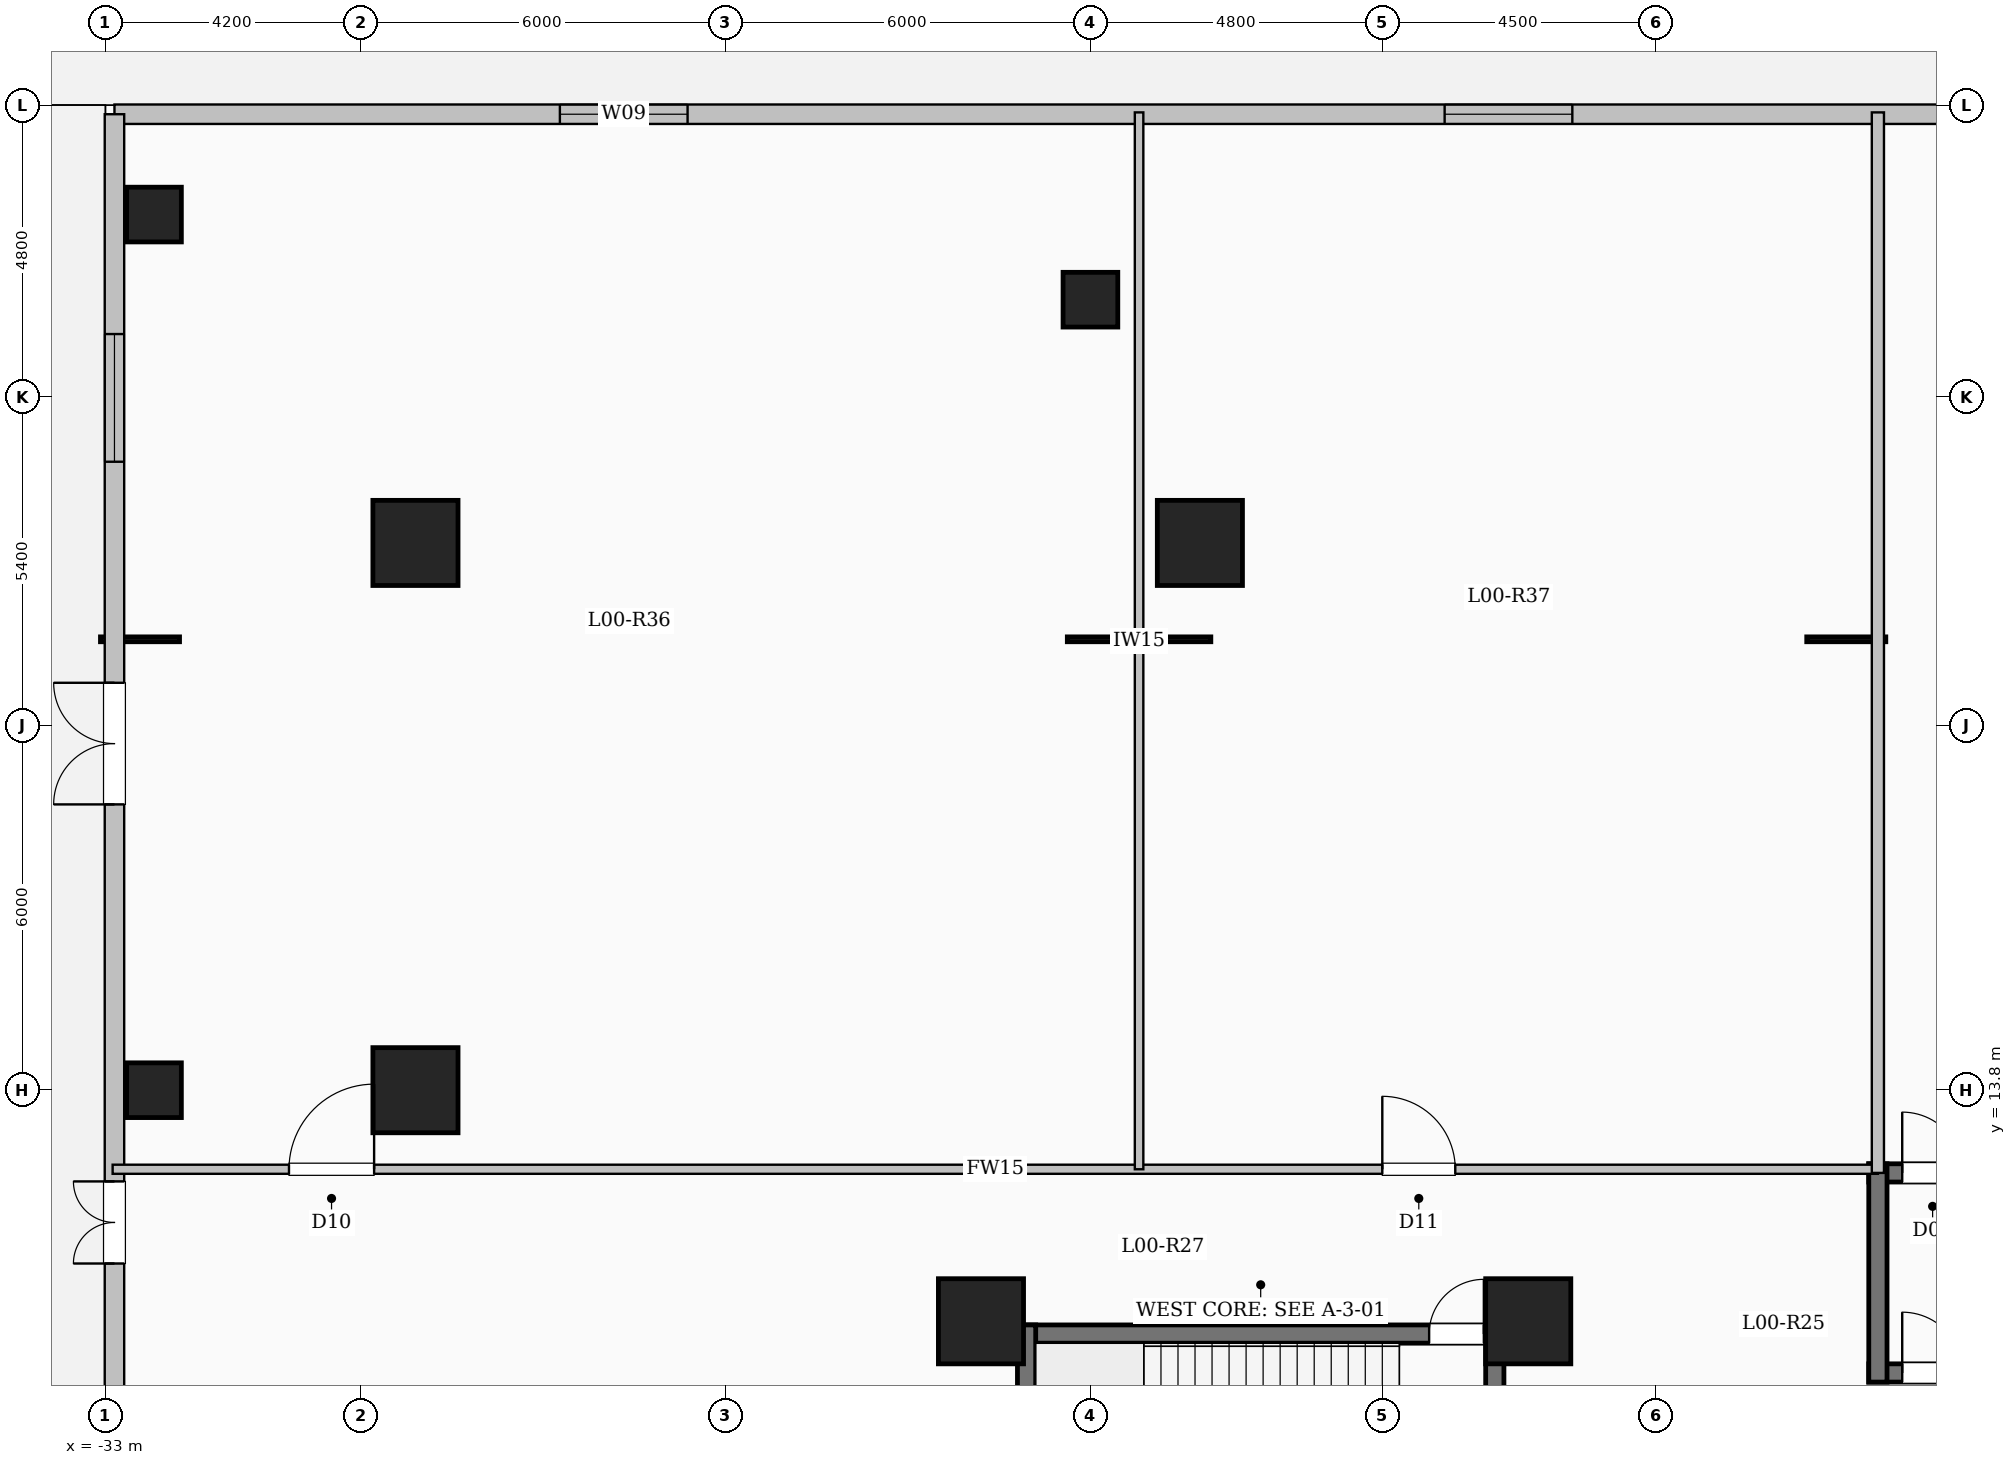
"""IFC4 building model, lengths in metres.
Left out: names, types, materials, properties, quantities, classifications, styles, units other than length and angle.
Written with IfcOpenShell. Run it as: python <this file> out.ifc"""

import sys

from ifc_helpers import new_model, si_unit, direction, frame, frame_2d, origin, origin_2d, place, context, subcontext, project, spatial, rectangle, extrude, element, fill, save


model = new_model("IFC4")
c1 = context("Model", 3, precision=1e-05, world=origin(), true_north=direction((0.0, 1.0)))
c2 = subcontext(c1, "Body", "Model", "MODEL_VIEW")
j1 = project(units=[si_unit("LENGTHUNIT", "METRE"), si_unit("PLANEANGLEUNIT", "RADIAN")], contexts=[c1])
p1 = place(None, origin())
s1 = spatial("IfcSite", under=j1, at=p1, CompositionType="ELEMENT")
p2 = place(p1, origin())
s2 = spatial("IfcBuilding", under=s1, at=p2, CompositionType="ELEMENT")
p3 = place(p2, origin())
s3 = spatial("IfcBuildingStorey", under=s2, at=p3, CompositionType="ELEMENT", Elevation=0.0)
for number, where, z_axis, x_axis in (
    (1, (-9.6, 10.0, 0.0), (0.0, 0.0, 1.0), (1.0, 0.0, 0.0)),
    (2, (-18.6, 10.0, 0.0), (0.0, 0.0, 1.0), (1.0, 0.0, 0.0)),
):
    element("IfcColumn", number, at=place(p3, frame(where, z_axis=z_axis, x_axis=x_axis)), inside=s3, PredefinedType="COLUMN", context=c2, shape_type="SweptSolid", body=[
        extrude(rectangle(XDim=1.4, YDim=1.4, at=origin_2d()), origin(), (0.0, 0.0, 1.0), 5.4),
    ])
for number, where, z_axis, x_axis in (
    (3, (-32.2, 13.8, 0.0), (0.0, 0.0, 1.0), (1.0, 0.0, 0.0)),
    (4, (-32.2, 28.2, 0.0), (0.0, 0.0, 1.0), (1.0, 0.0, 0.0)),
):
    element("IfcColumn", number, at=place(p3, frame(where, z_axis=z_axis, x_axis=x_axis)), inside=s3, PredefinedType="COLUMN", context=c2, shape_type="SweptSolid", body=[
        extrude(rectangle(XDim=0.9, YDim=0.9, at=origin_2d()), origin(), (0.0, 0.0, 1.0), 5.18),
    ])
p4 = place(p3, frame((-16.8, 26.8, 0.0), z_axis=(0.0, 0.0, 1.0), x_axis=(1.0, 0.0, 0.0)))
e5 = element("IfcColumn", 5, at=p4, inside=s3, PredefinedType="COLUMN", context=c2, shape_type="SweptSolid", body=[
    extrude(rectangle(XDim=0.9, YDim=0.9, at=origin_2d()), origin(), (0.0, 0.0, 1.0), 5.4),
])
for number, where, z_axis, x_axis in (
    (6, (-27.9, 22.8, 0.0), (0.0, 0.0, 1.0), (1.0, 0.0, 0.0)),
    (7, (-15.0, 22.8, 0.0), (0.0, 0.0, 1.0), (1.0, 0.0, 0.0)),
    (8, (-27.9, 13.8, 0.0), (0.0, 0.0, 1.0), (1.0, 0.0, 0.0)),
):
    element("IfcColumn", number, at=place(p3, frame(where, z_axis=z_axis, x_axis=x_axis)), inside=s3, PredefinedType="COLUMN", context=c2, shape_type="SweptSolid", body=[
        extrude(rectangle(XDim=1.4, YDim=1.4, at=origin_2d()), origin(), (0.0, 0.0, 1.0), 5.4),
    ])
p5 = place(p3, frame((-32.85, 29.85, 0.0), z_axis=(0.0, 0.0, 1.0), x_axis=(1.0, 0.0, 0.0)))
e9 = element("IfcWall", 9, at=p5, inside=s3, PredefinedType="SOLIDWALL", context=c2, shape_type="SweptSolid", body=[
    extrude(rectangle(XDim=65.7, YDim=0.32, at=frame_2d((32.85, 0.0))), origin(), (0.0, 0.0, 1.0), 5.1),
])
p6 = place(p5, frame((30.05, 0.0, 0.0)))
e10 = element("IfcOpeningElement", 10, at=p6, cuts=e9, PredefinedType="OPENING", context=c2, shape_type="SweptSolid", body=[
    extrude(rectangle(XDim=2.0, YDim=2.4, at=frame_2d((1.0, 1.2))), frame((0.0, 0.17, 0.0), z_axis=(0.0, -1.0, 0.0), x_axis=(1.0, 0.0, 0.0)), (0.0, 0.0, 1.0), 0.34),
])
p7 = place(p5, frame((33.65, 0.0, 0.0)))
e11 = element("IfcOpeningElement", 11, at=p7, cuts=e9, PredefinedType="OPENING", context=c2, shape_type="SweptSolid", body=[
    extrude(rectangle(XDim=2.0, YDim=2.4, at=frame_2d((1.0, 1.2))), frame((0.0, 0.17, 0.0), z_axis=(0.0, -1.0, 0.0), x_axis=(1.0, 0.0, 0.0)), (0.0, 0.0, 1.0), 0.34),
])
p8 = place(p5, frame((39.35, 0.0, 0.0)))
e12 = element("IfcOpeningElement", 12, at=p8, cuts=e9, PredefinedType="OPENING", context=c2, shape_type="SweptSolid", body=[
    extrude(rectangle(XDim=1.1, YDim=2.2, at=frame_2d((0.55, 1.1))), frame((0.0, 0.17, 0.0), z_axis=(0.0, -1.0, 0.0), x_axis=(1.0, 0.0, 0.0)), (0.0, 0.0, 1.0), 0.34),
])
p9 = place(p5, frame((58.05, 0.0, 0.0)))
e13 = element("IfcOpeningElement", 13, at=p9, cuts=e9, PredefinedType="OPENING", context=c2, shape_type="SweptSolid", body=[
    extrude(rectangle(XDim=2.4, YDim=2.6, at=frame_2d((1.2, 1.3))), frame((0.0, 0.17, 0.0), z_axis=(0.0, -1.0, 0.0), x_axis=(1.0, 0.0, 0.0)), (0.0, 0.0, 1.0), 0.34),
])
p10 = place(p5, frame((7.325, 0.0, 0.9)))
e14 = element("IfcOpeningElement", 14, at=p10, cuts=e9, PredefinedType="OPENING", context=c2, shape_type="SweptSolid", body=[
    extrude(rectangle(XDim=2.1, YDim=2.0, at=frame_2d((1.05, 1.0))), frame((0.0, 0.17, 0.0), z_axis=(0.0, -1.0, 0.0), x_axis=(1.0, 0.0, 0.0)), (0.0, 0.0, 1.0), 0.34),
])
p11 = place(p5, frame((21.875, 0.0, 0.9)))
e15 = element("IfcOpeningElement", 15, at=p11, cuts=e9, PredefinedType="OPENING", context=c2, shape_type="SweptSolid", body=[
    extrude(rectangle(XDim=2.1, YDim=2.0, at=frame_2d((1.05, 1.0))), frame((0.0, 0.17, 0.0), z_axis=(0.0, -1.0, 0.0), x_axis=(1.0, 0.0, 0.0)), (0.0, 0.0, 1.0), 0.34),
])
p12 = place(p5, frame((36.135, 0.0, 0.9)))
e16 = element("IfcOpeningElement", 16, at=p12, cuts=e9, PredefinedType="OPENING", context=c2, shape_type="SweptSolid", body=[
    extrude(rectangle(XDim=1.7, YDim=1.9, at=frame_2d((0.85, 0.95))), frame((0.0, 0.17, 0.0), z_axis=(0.0, -1.0, 0.0), x_axis=(1.0, 0.0, 0.0)), (0.0, 0.0, 1.0), 0.34),
])
p13 = place(p5, frame((40.86, 0.0, 0.9)))
e17 = element("IfcOpeningElement", 17, at=p13, cuts=e9, PredefinedType="OPENING", context=c2, shape_type="SweptSolid", body=[
    extrude(rectangle(XDim=1.7, YDim=1.9, at=frame_2d((0.85, 0.95))), frame((0.0, 0.17, 0.0), z_axis=(0.0, -1.0, 0.0), x_axis=(1.0, 0.0, 0.0)), (0.0, 0.0, 1.0), 0.34),
])
p14 = place(p5, frame((52.1, 0.0, 0.9)))
e18 = element("IfcOpeningElement", 18, at=p14, cuts=e9, PredefinedType="OPENING", context=c2, shape_type="SweptSolid", body=[
    extrude(rectangle(XDim=2.1, YDim=2.0, at=frame_2d((1.05, 1.0))), frame((0.0, 0.17, 0.0), z_axis=(0.0, -1.0, 0.0), x_axis=(1.0, 0.0, 0.0)), (0.0, 0.0, 1.0), 0.34),
])
p15 = place(p5, frame((62.035, 0.0, 0.9)))
e19 = element("IfcOpeningElement", 19, at=p15, cuts=e9, PredefinedType="OPENING", context=c2, shape_type="SweptSolid", body=[
    extrude(rectangle(XDim=2.1, YDim=2.0, at=frame_2d((1.05, 1.0))), frame((0.0, 0.17, 0.0), z_axis=(0.0, -1.0, 0.0), x_axis=(1.0, 0.0, 0.0)), (0.0, 0.0, 1.0), 0.34),
])
p16 = place(p3, frame((-32.85, -29.85, 0.0), z_axis=(0.0, 0.0, 1.0), x_axis=(0.0, 1.0, 0.0)))
e20 = element("IfcWall", 20, at=p16, inside=s3, PredefinedType="SOLIDWALL", context=c2, shape_type="SweptSolid", body=[
    extrude(rectangle(XDim=59.7, YDim=0.32, at=frame_2d((29.85, 0.0))), origin(), (0.0, 0.0, 1.0), 5.1),
])
p17 = place(p16, frame((40.8, 0.0, 0.0)))
e21 = element("IfcOpeningElement", 21, at=p17, cuts=e20, PredefinedType="OPENING", context=c2, shape_type="SweptSolid", body=[
    extrude(rectangle(XDim=1.35, YDim=2.2, at=frame_2d((0.675, 1.1))), frame((0.0, 0.17, 0.0), z_axis=(0.0, -1.0, 0.0), x_axis=(1.0, 0.0, 0.0)), (0.0, 0.0, 1.0), 0.34),
])
p18 = place(p16, frame((0.55, 0.0, 0.0)))
e22 = element("IfcOpeningElement", 22, at=p18, cuts=e20, PredefinedType="OPENING", context=c2, shape_type="SweptSolid", body=[
    extrude(rectangle(XDim=6.4, YDim=3.5, at=frame_2d((3.2, 1.75))), frame((0.0, 0.17, 0.0), z_axis=(0.0, -1.0, 0.0), x_axis=(1.0, 0.0, 0.0)), (0.0, 0.0, 1.0), 0.34),
])
p19 = place(p16, frame((48.35, 0.0, 0.0)))
e23 = element("IfcOpeningElement", 23, at=p19, cuts=e20, PredefinedType="OPENING", context=c2, shape_type="SweptSolid", body=[
    extrude(rectangle(XDim=2.0, YDim=2.4, at=frame_2d((1.0, 1.2))), frame((0.0, 0.17, 0.0), z_axis=(0.0, -1.0, 0.0), x_axis=(1.0, 0.0, 0.0)), (0.0, 0.0, 1.0), 0.34),
])
p20 = place(p16, frame((20.25, 0.0, 0.9)))
e24 = element("IfcOpeningElement", 24, at=p20, cuts=e20, PredefinedType="OPENING", context=c2, shape_type="SweptSolid", body=[
    extrude(rectangle(XDim=1.7, YDim=1.9, at=frame_2d((0.85, 0.95))), frame((0.0, 0.17, 0.0), z_axis=(0.0, -1.0, 0.0), x_axis=(1.0, 0.0, 0.0)), (0.0, 0.0, 1.0), 0.34),
])
p21 = place(p16, frame((53.985, 0.0, 0.9)))
e25 = element("IfcOpeningElement", 25, at=p21, cuts=e20, PredefinedType="OPENING", context=c2, shape_type="SweptSolid", body=[
    extrude(rectangle(XDim=2.1, YDim=2.0, at=frame_2d((1.05, 1.0))), frame((0.0, 0.17, 0.0), z_axis=(0.0, -1.0, 0.0), x_axis=(1.0, 0.0, 0.0)), (0.0, 0.0, 1.0), 0.34),
])
p22 = place(p3, frame((-18.0, 9.79, 0.0), z_axis=(0.0, 0.0, 1.0), x_axis=(1.0, 0.0, 0.0)))
e26 = element("IfcWall", 26, at=p22, inside=s3, PredefinedType="SHEAR", context=c2, shape_type="SweptSolid", body=[
    extrude(rectangle(XDim=8.0, YDim=0.3, at=frame_2d((4.0, 0.0))), origin(), (0.0, 0.0, 1.0), 5.4),
])
p23 = place(p22, frame((6.77, 0.0, 0.0)))
e27 = element("IfcOpeningElement", 27, at=p23, cuts=e26, PredefinedType="OPENING", context=c2, shape_type="SweptSolid", body=[
    extrude(rectangle(XDim=0.9, YDim=2.15, at=frame_2d((0.45, 1.075))), frame((0.0, 0.16, 0.0), z_axis=(0.0, -1.0, 0.0), x_axis=(1.0, 0.0, 0.0)), (0.0, 0.0, 1.0), 0.32),
])
for number, where, z_axis, x_axis in (
    (28, (-17.85, 6.35, 0.0), (0.0, 0.0, 1.0), (0.0, 1.0, 0.0)),
    (29, (-10.15, 6.35, 0.0), (0.0, 0.0, 1.0), (0.0, 1.0, 0.0)),
):
    element("IfcWall", number, at=place(p3, frame(where, z_axis=z_axis, x_axis=x_axis)), inside=s3, PredefinedType="SHEAR", context=c2, shape_type="SweptSolid", body=[
        extrude(rectangle(XDim=3.59, YDim=0.3, at=frame_2d((1.795, 0.0))), origin(), (0.0, 0.0, 1.0), 5.4),
    ])
p24 = place(p3, frame((-4.0, 12.44, 0.0), z_axis=(0.0, 0.0, 1.0), x_axis=(1.0, 0.0, 0.0)))
e30 = element("IfcWall", 30, at=p24, inside=s3, PredefinedType="SHEAR", context=c2, shape_type="SweptSolid", body=[
    extrude(rectangle(XDim=8.0, YDim=0.3, at=frame_2d((4.0, 0.0))), origin(), (0.0, 0.0, 1.0), 5.4),
])
p25 = place(p24, frame((0.55, 0.0, 0.0)))
e31 = element("IfcOpeningElement", 31, at=p25, cuts=e30, PredefinedType="OPENING", context=c2, shape_type="SweptSolid", body=[
    extrude(rectangle(XDim=1.0, YDim=2.15, at=frame_2d((0.5, 1.075))), frame((0.0, 0.16, 0.0), z_axis=(0.0, -1.0, 0.0), x_axis=(1.0, 0.0, 0.0)), (0.0, 0.0, 1.0), 0.32),
])
p26 = place(p3, frame((-4.0, 9.15, 0.0), z_axis=(0.0, 0.0, 1.0), x_axis=(1.0, 0.0, 0.0)))
e32 = element("IfcWall", 32, at=p26, inside=s3, PredefinedType="SHEAR", context=c2, shape_type="SweptSolid", body=[
    extrude(rectangle(XDim=8.0, YDim=0.3, at=frame_2d((4.0, 0.0))), origin(), (0.0, 0.0, 1.0), 5.4),
])
p27 = place(p26, frame((0.55, 0.0, 0.0)))
e33 = element("IfcOpeningElement", 33, at=p27, cuts=e32, PredefinedType="OPENING", context=c2, shape_type="SweptSolid", body=[
    extrude(rectangle(XDim=1.0, YDim=2.15, at=frame_2d((0.5, 1.075))), frame((0.0, 0.16, 0.0), z_axis=(0.0, -1.0, 0.0), x_axis=(1.0, 0.0, 0.0)), (0.0, 0.0, 1.0), 0.32),
])
p28 = place(p3, frame((-3.85, 9.0, 0.0), z_axis=(0.0, 0.0, 1.0), x_axis=(0.0, 1.0, 0.0)))
e34 = element("IfcWall", 34, at=p28, inside=s3, PredefinedType="SHEAR", context=c2, shape_type="SweptSolid", body=[
    extrude(rectangle(XDim=3.59, YDim=0.3, at=frame_2d((1.795, 0.0))), origin(), (0.0, 0.0, 1.0), 5.4),
])
p29 = place(p3, frame((-32.88, 12.5, 0.0), z_axis=(0.0, 0.0, 1.0), x_axis=(1.0, 0.0, 0.0)))
e35 = element("IfcWall", 35, at=p29, inside=s3, PredefinedType="PARTITIONING", context=c2, shape_type="SweptSolid", body=[
    extrude(rectangle(XDim=29.03, YDim=0.15, at=frame_2d((14.515, 0.0))), origin(), (0.0, 0.0, 1.0), 5.1),
])
p30 = place(p29, frame((2.9, 0.0, 0.0)))
e36 = element("IfcOpeningElement", 36, at=p30, cuts=e35, PredefinedType="OPENING", context=c2, shape_type="SweptSolid", body=[
    extrude(rectangle(XDim=1.4, YDim=2.2, at=frame_2d((0.7, 1.1))), frame((0.0, 0.085, 0.0), z_axis=(0.0, -1.0, 0.0), x_axis=(1.0, 0.0, 0.0)), (0.0, 0.0, 1.0), 0.17),
])
p31 = place(p29, frame((20.88, 0.0, 0.0)))
e37 = element("IfcOpeningElement", 37, at=p31, cuts=e35, PredefinedType="OPENING", context=c2, shape_type="SweptSolid", body=[
    extrude(rectangle(XDim=1.2, YDim=2.15, at=frame_2d((0.6, 1.075))), frame((0.0, 0.085, 0.0), z_axis=(0.0, -1.0, 0.0), x_axis=(1.0, 0.0, 0.0)), (0.0, 0.0, 1.0), 0.17),
])
p32 = place(p3, frame((-3.85, 12.44, 0.0), z_axis=(0.0, 0.0, 1.0), x_axis=(0.0, 1.0, 0.0)))
e38 = element("IfcWall", 38, at=p32, inside=s3, PredefinedType="SOLIDWALL", context=c2, shape_type="SweptSolid", body=[
    extrude(rectangle(XDim=17.44, YDim=0.2, at=frame_2d((8.72, 0.0))), origin(), (0.0, 0.0, 1.0), 5.1),
])
p33 = place(p3, frame((-16.0, 12.5, 0.0), z_axis=(0.0, 0.0, 1.0), x_axis=(0.0, 1.0, 0.0)))
e39 = element("IfcWall", 39, at=p33, inside=s3, PredefinedType="PARTITIONING", context=c2, shape_type="SweptSolid", body=[
    extrude(rectangle(XDim=17.38, YDim=0.14, at=frame_2d((8.69, 0.0))), origin(), (0.0, 0.0, 1.0), 4.285),
])
p34 = place(p10, origin())
e40 = element("IfcWindow", 40, at=p34, inside=s3, PartitioningType="SINGLE_PANEL", PredefinedType="WINDOW", context=c2, shape_type="SweptSolid", body=[
    extrude(rectangle(XDim=2.1, YDim=2.0, at=frame_2d((1.05, 1.0))), frame((0.0, 0.03, 0.0), z_axis=(0.0, -1.0, 0.0), x_axis=(1.0, 0.0, 0.0)), (0.0, 0.0, 1.0), 0.06),
])
fill(e14, e40)
p35 = place(p11, origin())
e41 = element("IfcWindow", 41, at=p35, inside=s3, PartitioningType="SINGLE_PANEL", PredefinedType="WINDOW", context=c2, shape_type="SweptSolid", body=[
    extrude(rectangle(XDim=2.1, YDim=2.0, at=frame_2d((1.05, 1.0))), frame((0.0, 0.03, 0.0), z_axis=(0.0, -1.0, 0.0), x_axis=(1.0, 0.0, 0.0)), (0.0, 0.0, 1.0), 0.06),
])
fill(e15, e41)
p36 = place(p17, origin())
e42 = element("IfcDoor", 42, at=p36, inside=s3, OperationType="DOUBLE_DOOR_SINGLE_SWING", PredefinedType="DOOR", context=c2, shape_type="SweptSolid", body=[
    extrude(rectangle(XDim=1.35, YDim=2.2, at=frame_2d((0.675, 1.1))), frame((0.0, 0.025, 0.0), z_axis=(0.0, -1.0, 0.0), x_axis=(1.0, 0.0, 0.0)), (0.0, 0.0, 1.0), 0.05),
])
fill(e21, e42)
p37 = place(p19, origin())
e43 = element("IfcDoor", 43, at=p37, inside=s3, OperationType="DOUBLE_DOOR_SINGLE_SWING", PredefinedType="DOOR", context=c2, shape_type="SweptSolid", body=[
    extrude(rectangle(XDim=2.0, YDim=2.4, at=frame_2d((1.0, 1.2))), frame((0.0, 0.025, 0.0), z_axis=(0.0, -1.0, 0.0), x_axis=(1.0, 0.0, 0.0)), (0.0, 0.0, 1.0), 0.05),
])
fill(e23, e43)
p38 = place(p21, origin())
e44 = element("IfcWindow", 44, at=p38, inside=s3, PartitioningType="SINGLE_PANEL", PredefinedType="WINDOW", context=c2, shape_type="SweptSolid", body=[
    extrude(rectangle(XDim=2.1, YDim=2.0, at=frame_2d((1.05, 1.0))), frame((0.0, 0.03, 0.0), z_axis=(0.0, -1.0, 0.0), x_axis=(1.0, 0.0, 0.0)), (0.0, 0.0, 1.0), 0.06),
])
fill(e25, e44)
p39 = place(p23, origin())
e45 = element("IfcDoor", 45, at=p39, inside=s3, OperationType="SINGLE_SWING_RIGHT", PredefinedType="DOOR", context=c2, shape_type="SweptSolid", body=[
    extrude(rectangle(XDim=0.9, YDim=2.15, at=frame_2d((0.45, 1.075))), frame((0.0, 0.025, 0.0), z_axis=(0.0, -1.0, 0.0), x_axis=(1.0, 0.0, 0.0)), (0.0, 0.0, 1.0), 0.05),
])
fill(e27, e45)
p40 = place(p25, origin())
e46 = element("IfcDoor", 46, at=p40, inside=s3, OperationType="SINGLE_SWING_LEFT", PredefinedType="DOOR", context=c2, shape_type="SweptSolid", body=[
    extrude(rectangle(XDim=1.0, YDim=2.15, at=frame_2d((0.5, 1.075))), frame((0.0, 0.025, 0.0), z_axis=(0.0, -1.0, 0.0), x_axis=(1.0, 0.0, 0.0)), (0.0, 0.0, 1.0), 0.05),
])
fill(e31, e46)
p41 = place(p27, origin())
e47 = element("IfcDoor", 47, at=p41, inside=s3, OperationType="SINGLE_SWING_LEFT", PredefinedType="DOOR", context=c2, shape_type="SweptSolid", body=[
    extrude(rectangle(XDim=1.0, YDim=2.15, at=frame_2d((0.5, 1.075))), frame((0.0, 0.025, 0.0), z_axis=(0.0, -1.0, 0.0), x_axis=(1.0, 0.0, 0.0)), (0.0, 0.0, 1.0), 0.05),
])
fill(e33, e47)
p42 = place(p30, origin())
e48 = element("IfcDoor", 48, at=p42, inside=s3, OperationType="SINGLE_SWING_RIGHT", PredefinedType="DOOR", context=c2, shape_type="SweptSolid", body=[
    extrude(rectangle(XDim=1.4, YDim=2.2, at=frame_2d((0.7, 1.1))), frame((0.0, 0.025, 0.0), z_axis=(0.0, -1.0, 0.0), x_axis=(1.0, 0.0, 0.0)), (0.0, 0.0, 1.0), 0.05),
])
fill(e36, e48)
p43 = place(p31, origin())
e49 = element("IfcDoor", 49, at=p43, inside=s3, OperationType="SINGLE_SWING_LEFT", PredefinedType="DOOR", context=c2, shape_type="SweptSolid", body=[
    extrude(rectangle(XDim=1.2, YDim=2.15, at=frame_2d((0.6, 1.075))), frame((0.0, 0.025, 0.0), z_axis=(0.0, -1.0, 0.0), x_axis=(1.0, 0.0, 0.0)), (0.0, 0.0, 1.0), 0.05),
])
fill(e37, e49)
save(model, sys.argv[1])
